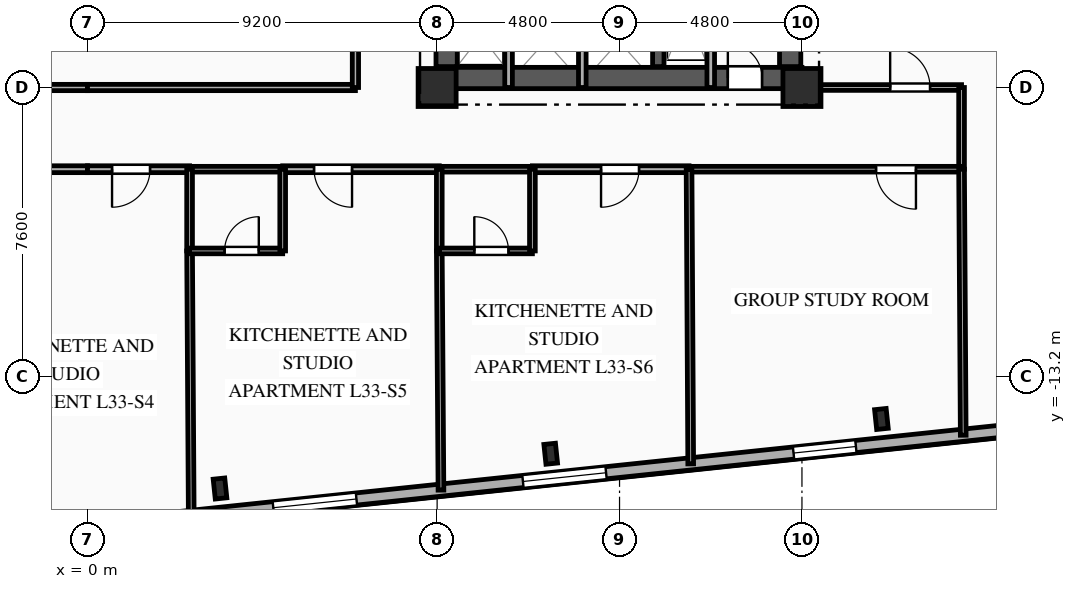
"""IFC4 building model, lengths in metres.
Left out: names, types, materials, properties, quantities, classifications, styles, units other than length and angle.
Written with IfcOpenShell. Run it as: python <this file> out.ifc"""

import sys

from ifc_helpers import new_model, si_unit, direction, frame, frame_2d, origin, origin_2d, place, context, subcontext, project, spatial, rectangle, i_section, extrude, element, fill, save


model = new_model("IFC4")
c1 = context("Model", 3, precision=1e-05, world=origin(), true_north=direction((0.0, 1.0)))
c2 = subcontext(c1, "Body", "Model", "MODEL_VIEW")
j1 = project(units=[si_unit("LENGTHUNIT", "METRE"), si_unit("PLANEANGLEUNIT", "RADIAN")], contexts=[c1])
p1 = place(None, origin())
s1 = spatial("IfcSite", under=j1, at=p1, CompositionType="ELEMENT")
p2 = place(p1, origin())
s2 = spatial("IfcBuilding", under=s1, at=p2, CompositionType="ELEMENT")
p3 = place(p2, frame((0.0, 0.0, 119.2)))
s3 = spatial("IfcBuildingStorey", under=s2, at=p3, CompositionType="ELEMENT", Elevation=119.2)
for number, where, z_axis, x_axis in (
    (1, (9.2, -5.6, 0.0), (0.0, 0.0, 1.0), (1.0, 0.0, 0.0)),
    (2, (18.8, -5.6, 0.0), (0.0, 0.0, 1.0), (1.0, 0.0, 0.0)),
):
    element("IfcColumn", number, at=place(p3, frame(where, z_axis=z_axis, x_axis=x_axis)), inside=s3, PredefinedType="COLUMN", context=c2, shape_type="SweptSolid", body=[
        extrude(rectangle(XDim=1.0, YDim=1.0, at=origin_2d()), origin(), (0.0, 0.0, 1.0), 3.35),
    ])
for number, where, z_axis, x_axis in (
    (3, (3.487, -16.151, 0.0), (0.0, 0.0, 1.0), (0.995, 0.105, 0.0)),
    (4, (12.189, -15.237, 0.0), (0.0, 0.0, 1.0), (0.995, 0.105, 0.0)),
    (5, (20.891, -14.322, 0.0), (0.0, 0.0, 1.0), (0.995, 0.105, 0.0)),
):
    element("IfcColumn", number, at=place(p3, frame(where, z_axis=z_axis, x_axis=x_axis)), inside=s3, PredefinedType="COLUMN", context=c2, shape_type="SweptSolid", body=[
        extrude(i_section(OverallWidth=0.306, OverallDepth=0.524, WebThickness=0.021, FlangeThickness=0.04, FilletRadius=0.027, at=origin_2d()), origin(), (0.0, 0.0, 1.0), 3.35),
    ])
p4 = place(p3, frame((30.307, -13.986, 0.0), z_axis=(0.0, 0.0, 1.0), x_axis=(-0.994521628355, -0.104531003701, 0.0)))
e6 = element("IfcWall", 6, at=p4, inside=s3, PredefinedType="SOLIDWALL", context=c2, shape_type="SweptSolid", body=[
    extrude(rectangle(XDim=53.8, YDim=0.32, at=frame_2d((26.9, 0.0))), origin(), (0.0, 0.0, 1.0), 3.045),
])
p5 = place(p4, frame((3.098, 0.0, 0.85)))
e7 = element("IfcOpeningElement", 7, at=p5, cuts=e6, PredefinedType="OPENING", context=c2, shape_type="SweptSolid", body=[
    extrude(rectangle(XDim=1.65, YDim=1.85, at=frame_2d((0.825, 0.925))), frame((0.0, 0.17, 0.0), z_axis=(0.0, -1.0, 0.0), x_axis=(1.0, 0.0, 0.0)), (0.0, 0.0, 1.0), 0.34),
])
p6 = place(p4, frame((10.143, 0.0, 0.85)))
e8 = element("IfcOpeningElement", 8, at=p6, cuts=e6, PredefinedType="OPENING", context=c2, shape_type="SweptSolid", body=[
    extrude(rectangle(XDim=1.65, YDim=1.85, at=frame_2d((0.825, 0.925))), frame((0.0, 0.17, 0.0), z_axis=(0.0, -1.0, 0.0), x_axis=(1.0, 0.0, 0.0)), (0.0, 0.0, 1.0), 0.34),
])
p7 = place(p4, frame((16.753, 0.0, 0.85)))
e9 = element("IfcOpeningElement", 9, at=p7, cuts=e6, PredefinedType="OPENING", context=c2, shape_type="SweptSolid", body=[
    extrude(rectangle(XDim=2.2, YDim=1.85, at=frame_2d((1.1, 0.925))), frame((0.0, 0.17, 0.0), z_axis=(0.0, -1.0, 0.0), x_axis=(1.0, 0.0, 0.0)), (0.0, 0.0, 1.0), 0.34),
])
p8 = place(p4, frame((23.358, 0.0, 0.85)))
e10 = element("IfcOpeningElement", 10, at=p8, cuts=e6, PredefinedType="OPENING", context=c2, shape_type="SweptSolid", body=[
    extrude(rectangle(XDim=2.2, YDim=1.85, at=frame_2d((1.1, 0.925))), frame((0.0, 0.17, 0.0), z_axis=(0.0, -1.0, 0.0), x_axis=(1.0, 0.0, 0.0)), (0.0, 0.0, 1.0), 0.34),
])
p9 = place(p4, frame((29.963, 0.0, 0.85)))
e11 = element("IfcOpeningElement", 11, at=p9, cuts=e6, PredefinedType="OPENING", context=c2, shape_type="SweptSolid", body=[
    extrude(rectangle(XDim=2.2, YDim=1.85, at=frame_2d((1.1, 0.925))), frame((0.0, 0.17, 0.0), z_axis=(0.0, -1.0, 0.0), x_axis=(1.0, 0.0, 0.0)), (0.0, 0.0, 1.0), 0.34),
])
p10 = place(p4, frame((36.568, 0.0, 0.85)))
e12 = element("IfcOpeningElement", 12, at=p10, cuts=e6, PredefinedType="OPENING", context=c2, shape_type="SweptSolid", body=[
    extrude(rectangle(XDim=2.2, YDim=1.85, at=frame_2d((1.1, 0.925))), frame((0.0, 0.17, 0.0), z_axis=(0.0, -1.0, 0.0), x_axis=(1.0, 0.0, 0.0)), (0.0, 0.0, 1.0), 0.34),
])
p11 = place(p4, frame((43.173, 0.0, 0.85)))
e13 = element("IfcOpeningElement", 13, at=p11, cuts=e6, PredefinedType="OPENING", context=c2, shape_type="SweptSolid", body=[
    extrude(rectangle(XDim=2.2, YDim=1.85, at=frame_2d((1.1, 0.925))), frame((0.0, 0.17, 0.0), z_axis=(0.0, -1.0, 0.0), x_axis=(1.0, 0.0, 0.0)), (0.0, 0.0, 1.0), 0.34),
])
p12 = place(p4, frame((49.653, 0.0, 0.85)))
e14 = element("IfcOpeningElement", 14, at=p12, cuts=e6, PredefinedType="OPENING", context=c2, shape_type="SweptSolid", body=[
    extrude(rectangle(XDim=1.65, YDim=1.85, at=frame_2d((0.825, 0.925))), frame((0.0, 0.17, 0.0), z_axis=(0.0, -1.0, 0.0), x_axis=(1.0, 0.0, 0.0)), (0.0, 0.0, 1.0), 0.34),
])
p13 = place(p3, frame((9.2, -5.35, 0.0), z_axis=(0.0, 0.0, 1.0), x_axis=(1.0, 0.0, 0.0)))
e15 = element("IfcWall", 15, at=p13, inside=s3, PredefinedType="SHEAR", context=c2, shape_type="SweptSolid", body=[
    extrude(rectangle(XDim=9.6, YDim=0.56, at=frame_2d((4.8, 0.0))), origin(), (0.0, 0.0, 1.0), 3.045),
])
p14 = place(p13, frame((7.65, 0.0, 0.0)))
e16 = element("IfcOpeningElement", 16, at=p14, cuts=e15, PredefinedType="OPENING", context=c2, shape_type="SweptSolid", body=[
    extrude(rectangle(XDim=0.9, YDim=2.1, at=frame_2d((0.45, 1.05))), frame((0.0, 0.29, 0.0), z_axis=(0.0, -1.0, 0.0), x_axis=(1.0, 0.0, 0.0)), (0.0, 0.0, 1.0), 0.58),
])
p15 = place(p3, frame((9.45, -5.05, 0.0), z_axis=(0.0, 0.0, 1.0), x_axis=(0.0, 1.0, 0.0)))
e17 = element("IfcWall", 17, at=p15, inside=s3, PredefinedType="SHEAR", context=c2, shape_type="SweptSolid", body=[
    extrude(rectangle(XDim=10.1, YDim=0.56, at=frame_2d((5.05, 0.0))), origin(), (0.0, 0.0, 1.0), 3.045),
])
p16 = place(p15, frame((7.15, 0.0, 0.0)))
e18 = element("IfcOpeningElement", 18, at=p16, cuts=e17, PredefinedType="OPENING", context=c2, shape_type="SweptSolid", body=[
    extrude(rectangle(XDim=0.9, YDim=2.1, at=frame_2d((0.45, 1.05))), frame((0.0, 0.29, 0.0), z_axis=(0.0, -1.0, 0.0), x_axis=(1.0, 0.0, 0.0)), (0.0, 0.0, 1.0), 0.58),
])
p17 = place(p15, frame((2.4, 0.0, 0.0)))
e19 = element("IfcOpeningElement", 19, at=p17, cuts=e17, PredefinedType="OPENING", context=c2, shape_type="SweptSolid", body=[
    extrude(rectangle(XDim=1.2, YDim=2.15, at=frame_2d((0.6, 1.075))), frame((0.0, 0.29, 0.0), z_axis=(0.0, -1.0, 0.0), x_axis=(1.0, 0.0, 0.0)), (0.0, 0.0, 1.0), 0.58),
])
p18 = place(p3, frame((18.49, -5.05, 0.0), z_axis=(0.0, 0.0, 1.0), x_axis=(0.0, 1.0, 0.0)))
e20 = element("IfcWall", 20, at=p18, inside=s3, PredefinedType="SHEAR", context=c2, shape_type="SweptSolid", body=[
    extrude(rectangle(XDim=10.1, YDim=0.56, at=frame_2d((5.05, 0.0))), origin(), (0.0, 0.0, 1.0), 3.045),
])
p19 = place(p3, frame((15.02, -5.05, 0.0), z_axis=(0.0, 0.0, 1.0), x_axis=(0.0, 1.0, 0.0)))
e21 = element("IfcWall", 21, at=p19, inside=s3, PredefinedType="SHEAR", context=c2, shape_type="SweptSolid", body=[
    extrude(rectangle(XDim=10.1, YDim=0.3, at=frame_2d((5.05, 0.0))), origin(), (0.0, 0.0, 1.0), 3.045),
])
p20 = place(p3, frame((16.4, -2.11, 0.0), z_axis=(0.0, 0.0, 1.0), x_axis=(0.0, -1.0, 0.0)))
e22 = element("IfcWall", 22, at=p20, inside=s3, PredefinedType="PARTITIONING", context=c2, shape_type="SweptSolid", body=[
    extrude(rectangle(XDim=3.49, YDim=0.2, at=frame_2d((1.745, 0.0))), origin(), (0.0, 0.0, 1.0), 3.045),
])
for number, where, z_axis, x_axis in (
    (23, (11.08, -5.6, 0.0), (0.0, 0.0, 1.0), (0.0, 1.0, 0.0)),
    (24, (13.02, -5.6, 0.0), (0.0, 0.0, 1.0), (0.0, 1.0, 0.0)),
):
    element("IfcWall", number, at=place(p3, frame(where, z_axis=z_axis, x_axis=x_axis)), inside=s3, PredefinedType="PARTITIONING", context=c2, shape_type="SweptSolid", body=[
        extrude(rectangle(XDim=2.25, YDim=0.2, at=frame_2d((1.125, 0.0))), origin(), (0.0, 0.0, 1.0), 3.045),
    ])
p21 = place(p3, frame((0.0, -7.75, 0.0), z_axis=(0.0, 0.0, 1.0), x_axis=(-1.0, 0.0, 0.0)))
e25 = element("IfcWall", 25, at=p21, inside=s3, PredefinedType="PARTITIONING", context=c2, shape_type="SweptSolid", body=[
    extrude(rectangle(XDim=1.436, YDim=0.18, at=frame_2d((0.718, 0.0))), origin(), (0.0, 0.0, 1.0), 3.045),
])
p22 = place(p3, frame((-7.05, -5.6, 0.0), z_axis=(0.0, 0.0, 1.0), x_axis=(1.0, 0.0, 0.0)))
e26 = element("IfcWall", 26, at=p22, inside=s3, PredefinedType="PARTITIONING", context=c2, shape_type="SweptSolid", body=[
    extrude(rectangle(XDim=7.05, YDim=0.165, at=frame_2d((3.525, 0.0))), origin(), (0.0, 0.0, 1.0), 2.53),
])
p23 = place(p22, frame((4.728, 0.0, 0.0)))
e27 = element("IfcOpeningElement", 27, at=p23, cuts=e26, PredefinedType="OPENING", context=c2, shape_type="SweptSolid", body=[
    extrude(rectangle(XDim=1.15, YDim=2.15, at=frame_2d((0.575, 1.075))), frame((0.0, 0.093, 0.0), z_axis=(0.0, -1.0, 0.0), x_axis=(1.0, 0.0, 0.0)), (0.0, 0.0, 1.0), 0.185),
])
p24 = place(p3, frame((18.8, -5.6, 0.0), z_axis=(0.0, 0.0, 1.0), x_axis=(1.0, 0.0, 0.0)))
e28 = element("IfcWall", 28, at=p24, inside=s3, PredefinedType="PARTITIONING", context=c2, shape_type="SweptSolid", body=[
    extrude(rectangle(XDim=4.2, YDim=0.15, at=frame_2d((2.1, 0.0))), origin(), (0.0, 0.0, 1.0), 2.53),
])
p25 = place(p24, frame((2.321, 0.0, 0.0)))
e29 = element("IfcOpeningElement", 29, at=p25, cuts=e28, PredefinedType="OPENING", context=c2, shape_type="SweptSolid", body=[
    extrude(rectangle(XDim=1.05, YDim=2.15, at=frame_2d((0.525, 1.075))), frame((0.0, 0.085, 0.0), z_axis=(0.0, -1.0, 0.0), x_axis=(1.0, 0.0, 0.0)), (0.0, 0.0, 1.0), 0.17),
])
p26 = place(p3, frame((23.0, -5.6, 0.0), z_axis=(0.0, 0.0, 1.0), x_axis=(0.0, -1.0, 0.0)))
e30 = element("IfcWall", 30, at=p26, inside=s3, PredefinedType="PARTITIONING", context=c2, shape_type="SweptSolid", body=[
    extrude(rectangle(XDim=2.15, YDim=0.15, at=frame_2d((1.075, 0.0))), origin(), (0.0, 0.0, 1.0), 3.045),
])
p27 = place(p3, frame((2.686, -7.75, 0.0), z_axis=(0.0, 0.0, 1.0), x_axis=(-1.0, 0.0, 0.0)))
e31 = element("IfcWall", 31, at=p27, inside=s3, PredefinedType="PARTITIONING", context=c2, shape_type="SweptSolid", body=[
    extrude(rectangle(XDim=2.686, YDim=0.18, at=frame_2d((1.343, 0.0))), origin(), (0.0, 0.0, 1.0), 3.045),
])
p28 = place(p27, frame((1.04, 0.0, 0.0)))
e32 = element("IfcOpeningElement", 32, at=p28, cuts=e31, PredefinedType="OPENING", context=c2, shape_type="SweptSolid", body=[
    extrude(rectangle(XDim=1.0, YDim=2.15, at=frame_2d((0.5, 1.075))), frame((0.0, 0.1, 0.0), z_axis=(0.0, -1.0, 0.0), x_axis=(1.0, 0.0, 0.0)), (0.0, 0.0, 1.0), 0.2),
])
p29 = place(p3, frame((9.257, -7.75, 0.0), z_axis=(0.0, 0.0, 1.0), x_axis=(-1.0, 0.0, 0.0)))
e33 = element("IfcWall", 33, at=p29, inside=s3, PredefinedType="PARTITIONING", context=c2, shape_type="SweptSolid", body=[
    extrude(rectangle(XDim=4.121, YDim=0.18, at=frame_2d((2.061, 0.0))), origin(), (0.0, 0.0, 1.0), 3.045),
])
p30 = place(p29, frame((2.296, 0.0, 0.0)))
e34 = element("IfcOpeningElement", 34, at=p30, cuts=e33, PredefinedType="OPENING", context=c2, shape_type="SweptSolid", body=[
    extrude(rectangle(XDim=1.0, YDim=2.15, at=frame_2d((0.5, 1.075))), frame((0.0, 0.1, 0.0), z_axis=(0.0, -1.0, 0.0), x_axis=(1.0, 0.0, 0.0)), (0.0, 0.0, 1.0), 0.2),
])
p31 = place(p3, frame((5.136, -7.75, 0.0), z_axis=(0.0, 0.0, 1.0), x_axis=(-1.0, 0.0, 0.0)))
e35 = element("IfcWall", 35, at=p31, inside=s3, PredefinedType="PLUMBINGWALL", context=c2, shape_type="SweptSolid", body=[
    extrude(rectangle(XDim=2.45, YDim=0.15, at=frame_2d((1.225, 0.0))), origin(), (0.0, 0.0, 1.0), 3.045),
])
p32 = place(p3, frame((15.829, -7.75, 0.0), z_axis=(0.0, 0.0, 1.0), x_axis=(-1.0, 0.0, 0.0)))
e36 = element("IfcWall", 36, at=p32, inside=s3, PredefinedType="PARTITIONING", context=c2, shape_type="SweptSolid", body=[
    extrude(rectangle(XDim=4.122, YDim=0.18, at=frame_2d((2.061, 0.0))), origin(), (0.0, 0.0, 1.0), 3.045),
])
p33 = place(p32, frame((1.316, 0.0, 0.0)))
e37 = element("IfcOpeningElement", 37, at=p33, cuts=e36, PredefinedType="OPENING", context=c2, shape_type="SweptSolid", body=[
    extrude(rectangle(XDim=1.0, YDim=2.15, at=frame_2d((0.5, 1.075))), frame((0.0, 0.1, 0.0), z_axis=(0.0, -1.0, 0.0), x_axis=(1.0, 0.0, 0.0)), (0.0, 0.0, 1.0), 0.2),
])
p34 = place(p3, frame((11.707, -7.75, 0.0), z_axis=(0.0, 0.0, 1.0), x_axis=(-1.0, 0.0, 0.0)))
e38 = element("IfcWall", 38, at=p34, inside=s3, PredefinedType="PLUMBINGWALL", context=c2, shape_type="SweptSolid", body=[
    extrude(rectangle(XDim=2.45, YDim=0.15, at=frame_2d((1.225, 0.0))), origin(), (0.0, 0.0, 1.0), 3.045),
])
p35 = place(p3, frame((23.0, -7.75, 0.0), z_axis=(0.0, 0.0, 1.0), x_axis=(-1.0, 0.0, 0.0)))
e39 = element("IfcWall", 39, at=p35, inside=s3, PredefinedType="PARTITIONING", context=c2, shape_type="SweptSolid", body=[
    extrude(rectangle(XDim=7.171, YDim=0.15, at=frame_2d((3.585, 0.0))), origin(), (0.0, 0.0, 1.0), 3.045),
])
p36 = place(p35, frame((1.2, 0.0, 0.0)))
e40 = element("IfcOpeningElement", 40, at=p36, cuts=e39, PredefinedType="OPENING", context=c2, shape_type="SweptSolid", body=[
    extrude(rectangle(XDim=1.05, YDim=2.15, at=frame_2d((0.525, 1.075))), frame((0.0, 0.085, 0.0), z_axis=(0.0, -1.0, 0.0), x_axis=(1.0, 0.0, 0.0)), (0.0, 0.0, 1.0), 0.17),
])
p37 = place(p3, frame((0.0, -5.6, 0.0), z_axis=(0.0, 0.0, 1.0), x_axis=(1.0, 0.0, 0.0)))
e41 = element("IfcWall", 41, at=p37, inside=s3, PredefinedType="PARTITIONING", context=c2, shape_type="SweptSolid", body=[
    extrude(rectangle(XDim=7.05, YDim=0.165, at=frame_2d((3.525, 0.0))), origin(), (0.0, 0.0, 1.0), 2.53),
])
p38 = place(p3, frame((7.05, -5.6, 0.0), z_axis=(0.0, 0.0, 1.0), x_axis=(0.0, 1.0, 0.0)))
e42 = element("IfcWall", 42, at=p38, inside=s3, PredefinedType="PARTITIONING", context=c2, shape_type="SweptSolid", body=[
    extrude(rectangle(XDim=7.05, YDim=0.165, at=frame_2d((3.525, 0.0))), origin(), (0.0, 0.0, 1.0), 3.045),
])
p39 = place(p3, frame((23.044, -14.749, 0.0), z_axis=(0.0, 0.0, 1.0), x_axis=(-0.006278653971, 0.999980289058, 0.0)))
e43 = element("IfcWall", 43, at=p39, inside=s3, PredefinedType="PARTITIONING", context=c2, shape_type="SweptSolid", body=[
    extrude(rectangle(XDim=6.999, YDim=0.15, at=frame_2d((3.5, 0.0))), origin(), (0.0, 0.0, 1.0), 3.045),
])
p40 = place(p3, frame((2.686, -9.9, 0.0), z_axis=(0.0, 0.0, 1.0), x_axis=(0.006291821768, -0.999980206294, 0.0)))
e44 = element("IfcWall", 44, at=p40, inside=s3, PredefinedType="PARTITIONING", context=c2, shape_type="SweptSolid", body=[
    extrude(rectangle(XDim=6.985, YDim=0.15, at=frame_2d((3.492, 0.0))), origin(), (0.0, 0.0, 1.0), 3.045),
])
p41 = place(p3, frame((2.686, -7.75, 0.0), z_axis=(0.0, 0.0, 1.0), x_axis=(0.0, -1.0, 0.0)))
e45 = element("IfcWall", 45, at=p41, inside=s3, PredefinedType="PLUMBINGWALL", context=c2, shape_type="SweptSolid", body=[
    extrude(rectangle(XDim=2.15, YDim=0.15, at=frame_2d((1.075, 0.0))), origin(), (0.0, 0.0, 1.0), 3.045),
])
p42 = place(p3, frame((2.686, -9.9, 0.0), z_axis=(0.0, 0.0, 1.0), x_axis=(1.0, 0.0, 0.0)))
e46 = element("IfcWall", 46, at=p42, inside=s3, PredefinedType="PLUMBINGWALL", context=c2, shape_type="SweptSolid", body=[
    extrude(rectangle(XDim=2.45, YDim=0.15, at=frame_2d((1.225, 0.0))), origin(), (0.0, 0.0, 1.0), 3.045),
])
p43 = place(p42, frame((0.921, 0.0, 0.0)))
e47 = element("IfcOpeningElement", 47, at=p43, cuts=e46, PredefinedType="OPENING", context=c2, shape_type="SweptSolid", body=[
    extrude(rectangle(XDim=0.9, YDim=2.1, at=frame_2d((0.45, 1.05))), frame((0.0, 0.085, 0.0), z_axis=(0.0, -1.0, 0.0), x_axis=(1.0, 0.0, 0.0)), (0.0, 0.0, 1.0), 0.17),
])
p44 = place(p3, frame((5.136, -9.9, 0.0), z_axis=(0.0, 0.0, 1.0), x_axis=(0.0, 1.0, 0.0)))
e48 = element("IfcWall", 48, at=p44, inside=s3, PredefinedType="PLUMBINGWALL", context=c2, shape_type="SweptSolid", body=[
    extrude(rectangle(XDim=2.15, YDim=0.15, at=frame_2d((1.075, 0.0))), origin(), (0.0, 0.0, 1.0), 3.045),
])
p45 = place(p3, frame((9.257, -9.9, 0.0), z_axis=(0.0, 0.0, 1.0), x_axis=(0.006943468909, -0.999975893829, 0.0)))
e49 = element("IfcWall", 49, at=p45, inside=s3, PredefinedType="PARTITIONING", context=c2, shape_type="SweptSolid", body=[
    extrude(rectangle(XDim=6.294, YDim=0.15, at=frame_2d((3.147, 0.0))), origin(), (0.0, 0.0, 1.0), 3.045),
])
p46 = place(p3, frame((9.257, -7.75, 0.0), z_axis=(0.0, 0.0, 1.0), x_axis=(0.0, -1.0, 0.0)))
e50 = element("IfcWall", 50, at=p46, inside=s3, PredefinedType="PLUMBINGWALL", context=c2, shape_type="SweptSolid", body=[
    extrude(rectangle(XDim=2.15, YDim=0.15, at=frame_2d((1.075, 0.0))), origin(), (0.0, 0.0, 1.0), 3.045),
])
p47 = place(p3, frame((9.257, -9.9, 0.0), z_axis=(0.0, 0.0, 1.0), x_axis=(1.0, 0.0, 0.0)))
e51 = element("IfcWall", 51, at=p47, inside=s3, PredefinedType="PLUMBINGWALL", context=c2, shape_type="SweptSolid", body=[
    extrude(rectangle(XDim=2.45, YDim=0.15, at=frame_2d((1.225, 0.0))), origin(), (0.0, 0.0, 1.0), 3.045),
])
p48 = place(p47, frame((0.921, 0.0, 0.0)))
e52 = element("IfcOpeningElement", 52, at=p48, cuts=e51, PredefinedType="OPENING", context=c2, shape_type="SweptSolid", body=[
    extrude(rectangle(XDim=0.9, YDim=2.1, at=frame_2d((0.45, 1.05))), frame((0.0, 0.085, 0.0), z_axis=(0.0, -1.0, 0.0), x_axis=(1.0, 0.0, 0.0)), (0.0, 0.0, 1.0), 0.17),
])
p49 = place(p3, frame((11.707, -9.9, 0.0), z_axis=(0.0, 0.0, 1.0), x_axis=(0.0, 1.0, 0.0)))
e53 = element("IfcWall", 53, at=p49, inside=s3, PredefinedType="PLUMBINGWALL", context=c2, shape_type="SweptSolid", body=[
    extrude(rectangle(XDim=2.15, YDim=0.15, at=frame_2d((1.075, 0.0))), origin(), (0.0, 0.0, 1.0), 3.045),
])
p50 = place(p3, frame((15.829, -7.75, 0.0), z_axis=(0.0, 0.0, 1.0), x_axis=(0.00563681802, -0.999984113015, 0.0)))
e54 = element("IfcWall", 54, at=p50, inside=s3, PredefinedType="PARTITIONING", context=c2, shape_type="SweptSolid", body=[
    extrude(rectangle(XDim=7.753, YDim=0.15, at=frame_2d((3.876, 0.0))), origin(), (0.0, 0.0, 1.0), 3.045),
])
p51 = place(p6, origin())
e55 = element("IfcWindow", 55, at=p51, inside=s3, PartitioningType="SINGLE_PANEL", PredefinedType="WINDOW", context=c2, shape_type="SweptSolid", body=[
    extrude(rectangle(XDim=1.65, YDim=1.85, at=frame_2d((0.825, 0.925))), frame((0.0, 0.03, 0.0), z_axis=(0.0, -1.0, 0.0), x_axis=(1.0, 0.0, 0.0)), (0.0, 0.0, 1.0), 0.06),
])
fill(e8, e55)
p52 = place(p7, origin())
e56 = element("IfcWindow", 56, at=p52, inside=s3, PartitioningType="SINGLE_PANEL", PredefinedType="WINDOW", context=c2, shape_type="SweptSolid", body=[
    extrude(rectangle(XDim=2.2, YDim=1.85, at=frame_2d((1.1, 0.925))), frame((0.0, 0.03, 0.0), z_axis=(0.0, -1.0, 0.0), x_axis=(1.0, 0.0, 0.0)), (0.0, 0.0, 1.0), 0.06),
])
fill(e9, e56)
p53 = place(p8, origin())
e57 = element("IfcWindow", 57, at=p53, inside=s3, PartitioningType="SINGLE_PANEL", PredefinedType="WINDOW", context=c2, shape_type="SweptSolid", body=[
    extrude(rectangle(XDim=2.2, YDim=1.85, at=frame_2d((1.1, 0.925))), frame((0.0, 0.03, 0.0), z_axis=(0.0, -1.0, 0.0), x_axis=(1.0, 0.0, 0.0)), (0.0, 0.0, 1.0), 0.06),
])
fill(e10, e57)
p54 = place(p14, origin())
e58 = element("IfcDoor", 58, at=p54, inside=s3, OperationType="SINGLE_SWING_LEFT", PredefinedType="DOOR", context=c2, shape_type="SweptSolid", body=[
    extrude(rectangle(XDim=0.9, YDim=2.1, at=frame_2d((0.45, 1.05))), frame((0.0, 0.025, 0.0), z_axis=(0.0, -1.0, 0.0), x_axis=(1.0, 0.0, 0.0)), (0.0, 0.0, 1.0), 0.05),
])
fill(e16, e58)
p55 = place(p25, origin())
e59 = element("IfcDoor", 59, at=p55, inside=s3, OperationType="SINGLE_SWING_LEFT", PredefinedType="DOOR", context=c2, shape_type="SweptSolid", body=[
    extrude(rectangle(XDim=1.05, YDim=2.15, at=frame_2d((0.525, 1.075))), frame((0.0, 0.025, 0.0), z_axis=(0.0, -1.0, 0.0), x_axis=(1.0, 0.0, 0.0)), (0.0, 0.0, 1.0), 0.05),
])
fill(e29, e59)
p56 = place(p28, origin())
e60 = element("IfcDoor", 60, at=p56, inside=s3, OperationType="SINGLE_SWING_RIGHT", PredefinedType="DOOR", context=c2, shape_type="SweptSolid", body=[
    extrude(rectangle(XDim=1.0, YDim=2.15, at=frame_2d((0.5, 1.075))), frame((0.0, 0.025, 0.0), z_axis=(0.0, -1.0, 0.0), x_axis=(1.0, 0.0, 0.0)), (0.0, 0.0, 1.0), 0.05),
])
fill(e32, e60)
p57 = place(p30, origin())
e61 = element("IfcDoor", 61, at=p57, inside=s3, OperationType="SINGLE_SWING_LEFT", PredefinedType="DOOR", context=c2, shape_type="SweptSolid", body=[
    extrude(rectangle(XDim=1.0, YDim=2.15, at=frame_2d((0.5, 1.075))), frame((0.0, 0.025, 0.0), z_axis=(0.0, -1.0, 0.0), x_axis=(1.0, 0.0, 0.0)), (0.0, 0.0, 1.0), 0.05),
])
fill(e34, e61)
p58 = place(p33, origin())
e62 = element("IfcDoor", 62, at=p58, inside=s3, OperationType="SINGLE_SWING_RIGHT", PredefinedType="DOOR", context=c2, shape_type="SweptSolid", body=[
    extrude(rectangle(XDim=1.0, YDim=2.15, at=frame_2d((0.5, 1.075))), frame((0.0, 0.025, 0.0), z_axis=(0.0, -1.0, 0.0), x_axis=(1.0, 0.0, 0.0)), (0.0, 0.0, 1.0), 0.05),
])
fill(e37, e62)
p59 = place(p36, origin())
e63 = element("IfcDoor", 63, at=p59, inside=s3, OperationType="SINGLE_SWING_LEFT", PredefinedType="DOOR", context=c2, shape_type="SweptSolid", body=[
    extrude(rectangle(XDim=1.05, YDim=2.15, at=frame_2d((0.525, 1.075))), frame((0.0, 0.025, 0.0), z_axis=(0.0, -1.0, 0.0), x_axis=(1.0, 0.0, 0.0)), (0.0, 0.0, 1.0), 0.05),
])
fill(e40, e63)
p60 = place(p43, origin())
e64 = element("IfcDoor", 64, at=p60, inside=s3, OperationType="SINGLE_SWING_RIGHT", PredefinedType="DOOR", context=c2, shape_type="SweptSolid", body=[
    extrude(rectangle(XDim=0.9, YDim=2.1, at=frame_2d((0.45, 1.05))), frame((0.0, 0.025, 0.0), z_axis=(0.0, -1.0, 0.0), x_axis=(1.0, 0.0, 0.0)), (0.0, 0.0, 1.0), 0.05),
])
fill(e47, e64)
p61 = place(p48, origin())
e65 = element("IfcDoor", 65, at=p61, inside=s3, OperationType="SINGLE_SWING_LEFT", PredefinedType="DOOR", context=c2, shape_type="SweptSolid", body=[
    extrude(rectangle(XDim=0.9, YDim=2.1, at=frame_2d((0.45, 1.05))), frame((0.0, 0.025, 0.0), z_axis=(0.0, -1.0, 0.0), x_axis=(1.0, 0.0, 0.0)), (0.0, 0.0, 1.0), 0.05),
])
fill(e52, e65)
save(model, sys.argv[1])
